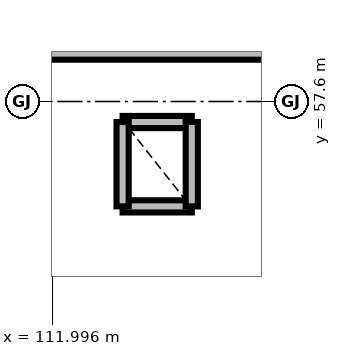
"""IFC4 building model, lengths in metres.
Left out: names, types, materials, properties, quantities, classifications, styles, units other than length and angle.
Written with IfcOpenShell. Run it as: python <this file> out.ifc"""

import sys

from ifc_helpers import new_model, si_unit, direction, frame, frame_2d, origin, place, context, subcontext, project, spatial, rectangle, extrude, element, save


model = new_model("IFC4")
c1 = context("Model", 3, precision=1e-05, world=origin(), true_north=direction((0.0, 1.0)))
c2 = subcontext(c1, "Body", "Model", "MODEL_VIEW")
j1 = project(units=[si_unit("LENGTHUNIT", "METRE"), si_unit("PLANEANGLEUNIT", "RADIAN")], contexts=[c1])
p1 = place(None, origin())
s1 = spatial("IfcSite", under=j1, at=p1, CompositionType="ELEMENT")
p2 = place(p1, origin())
s2 = spatial("IfcBuilding", under=s1, at=p2, CompositionType="ELEMENT")
p3 = place(p2, frame((0.0, 0.0, 9.3)))
s3 = spatial("IfcBuildingStorey", under=s2, at=p3, CompositionType="ELEMENT", Elevation=9.3)
p4 = place(p3, frame((112.92, 56.22, 0.0), z_axis=(0.0, 0.0, 1.0), x_axis=(1.0, 0.0, 0.0)))
e1 = element("IfcWall", 1, at=p4, inside=s3, PredefinedType="PARTITIONING", context=c2, shape_type="SweptSolid", body=[
    extrude(rectangle(XDim=0.91, YDim=0.16, at=frame_2d((0.455, 0.0))), origin(), (0.0, 0.0, 1.0), 3.475),
])
p5 = place(p3, frame((113.83, 57.33, 0.0), z_axis=(0.0, 0.0, 1.0), x_axis=(-1.0, 0.0, 0.0)))
e2 = element("IfcWall", 2, at=p5, inside=s3, PredefinedType="PARTITIONING", context=c2, shape_type="SweptSolid", body=[
    extrude(rectangle(XDim=0.91, YDim=0.16, at=frame_2d((0.455, 0.0))), origin(), (0.0, 0.0, 1.0), 3.175),
])
for number, where, z_axis, x_axis in (
    (3, (112.92, 57.33, 0.0), (0.0, 0.0, 1.0), (0.0, -1.0, 0.0)),
    (4, (113.83, 56.22, 0.0), (0.0, 0.0, 1.0), (0.0, 1.0, 0.0)),
):
    element("IfcWall", number, at=place(p3, frame(where, z_axis=z_axis, x_axis=x_axis)), inside=s3, PredefinedType="PARTITIONING", context=c2, shape_type="SweptSolid", body=[
        extrude(rectangle(XDim=1.11, YDim=0.16, at=frame_2d((0.555, 0.0))), origin(), (0.0, 0.0, 1.0), 3.175),
    ])
p6 = place(p3, frame((134.18, 58.25, 0.0), z_axis=(0.0, 0.0, 1.0), x_axis=(-1.0, 0.0, 0.0)))
e5 = element("IfcWall", 5, at=p6, inside=s3, PredefinedType="SOLIDWALL", context=c2, shape_type="SweptSolid", body=[
    extrude(rectangle(XDim=31.09, YDim=0.2, at=frame_2d((15.545, 0.0))), origin(), (0.0, 0.0, 1.0), 3.325),
])
p7 = place(p6, frame((28.405, 0.0, 0.0)))
e6 = element("IfcOpeningElement", 6, at=p7, cuts=e5, PredefinedType="OPENING", context=c2, shape_type="SweptSolid", body=[
    extrude(rectangle(XDim=1.55, YDim=2.2, at=frame_2d((0.775, 1.1))), frame((0.0, 0.11, 0.0), z_axis=(0.0, -1.0, 0.0), x_axis=(1.0, 0.0, 0.0)), (0.0, 0.0, 1.0), 0.22),
])
save(model, sys.argv[1])
